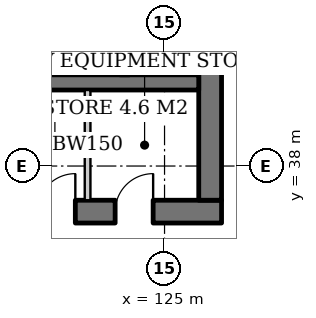
"""IFC4 building model, lengths in metres.
Left out: names, types, materials, properties, quantities, classifications, styles, units other than length and angle.
Written with IfcOpenShell. Run it as: python <this file> out.ifc"""

import sys

from ifc_helpers import new_model, si_unit, direction, frame, frame_2d, origin, place, context, subcontext, project, spatial, rectangle, extrude, element, fill, save


model = new_model("IFC4")
c1 = context("Model", 3, precision=1e-05, world=origin(), true_north=direction((0.0, 1.0)))
c2 = subcontext(c1, "Body", "Model", "MODEL_VIEW")
j1 = project(units=[si_unit("LENGTHUNIT", "METRE"), si_unit("PLANEANGLEUNIT", "RADIAN")], contexts=[c1])
p1 = place(None, origin())
s1 = spatial("IfcSite", under=j1, at=p1, CompositionType="ELEMENT")
p2 = place(p1, origin())
s2 = spatial("IfcBuilding", under=s1, at=p2, CompositionType="ELEMENT")
p3 = place(p2, frame((0.0, 0.0, 6.0)))
s3 = spatial("IfcBuildingStorey", under=s2, at=p3, CompositionType="ELEMENT", Elevation=6.0)
p4 = place(p3, frame((107.5, 36.8, 0.0), z_axis=(0.0, 0.0, 1.0), x_axis=(1.0, 0.0, 0.0)))
e1 = element("IfcWall", 1, at=p4, inside=s3, PredefinedType="SHEAR", context=c2, shape_type="SweptSolid", body=[
    extrude(rectangle(XDim=19.0, YDim=0.6, at=frame_2d((9.5, 0.0))), origin(), (0.0, 0.0, 1.0), 5.0),
])
p5 = place(p4, frame((3.9, 0.0, 0.0)))
e2 = element("IfcOpeningElement", 2, at=p5, cuts=e1, PredefinedType="OPENING", context=c2, shape_type="SweptSolid", body=[
    extrude(rectangle(XDim=1.0, YDim=2.1, at=frame_2d((0.5, 1.05))), frame((0.0, 0.31, 0.0), z_axis=(0.0, -1.0, 0.0), x_axis=(1.0, 0.0, 0.0)), (0.0, 0.0, 1.0), 0.62),
])
p6 = place(p4, frame((14.153, 0.0, 0.0)))
e3 = element("IfcOpeningElement", 3, at=p6, cuts=e1, PredefinedType="OPENING", context=c2, shape_type="SweptSolid", body=[
    extrude(rectangle(XDim=1.0, YDim=2.1, at=frame_2d((0.5, 1.05))), frame((0.0, 0.31, 0.0), z_axis=(0.0, -1.0, 0.0), x_axis=(1.0, 0.0, 0.0)), (0.0, 0.0, 1.0), 0.62),
])
p7 = place(p4, frame((16.2, 0.0, 0.0)))
e4 = element("IfcOpeningElement", 4, at=p7, cuts=e1, PredefinedType="OPENING", context=c2, shape_type="SweptSolid", body=[
    extrude(rectangle(XDim=1.0, YDim=2.1, at=frame_2d((0.5, 1.05))), frame((0.0, 0.31, 0.0), z_axis=(0.0, -1.0, 0.0), x_axis=(1.0, 0.0, 0.0)), (0.0, 0.0, 1.0), 0.62),
])
p8 = place(p3, frame((126.2, 37.1, 0.0), z_axis=(0.0, 0.0, 1.0), x_axis=(0.0, 1.0, 0.0)))
e5 = element("IfcWall", 5, at=p8, inside=s3, PredefinedType="SHEAR", context=c2, shape_type="SweptSolid", body=[
    extrude(rectangle(XDim=17.8, YDim=0.6, at=frame_2d((8.9, 0.0))), origin(), (0.0, 0.0, 1.0), 5.0),
])
p9 = place(p8, frame((8.0, 0.0, 0.0)))
e6 = element("IfcOpeningElement", 6, at=p9, cuts=e5, PredefinedType="OPENING", context=c2, shape_type="SweptSolid", body=[
    extrude(rectangle(XDim=1.8, YDim=2.4, at=frame_2d((0.9, 1.2))), frame((0.0, 0.31, 0.0), z_axis=(0.0, -1.0, 0.0), x_axis=(1.0, 0.0, 0.0)), (0.0, 0.0, 1.0), 0.62),
])
p10 = place(p3, frame((108.1, 40.2, 0.0), z_axis=(0.0, 0.0, 1.0), x_axis=(1.0, 0.0, 0.0)))
e7 = element("IfcWall", 7, at=p10, inside=s3, PredefinedType="SHEAR", context=c2, shape_type="SweptSolid", body=[
    extrude(rectangle(XDim=17.8, YDim=0.4, at=frame_2d((8.9, 0.0))), origin(), (0.0, 0.0, 1.0), 5.0),
])
p11 = place(p3, frame((123.955, 44.25, 0.0), z_axis=(0.0, 0.0, 1.0), x_axis=(0.0, -1.0, 0.0)))
e8 = element("IfcWall", 8, at=p11, inside=s3, PredefinedType="SHEAR", context=c2, shape_type="SweptSolid", body=[
    extrude(rectangle(XDim=3.85, YDim=0.25, at=frame_2d((1.925, 0.0))), origin(), (0.0, 0.0, 1.0), 5.0),
])
p12 = place(p3, frame((122.975, 37.1, 0.0), z_axis=(0.0, 0.0, 1.0), x_axis=(0.0, 1.0, 0.0)))
e9 = element("IfcWall", 9, at=p12, inside=s3, PredefinedType="SOLIDWALL", context=c2, shape_type="SweptSolid", body=[
    extrude(rectangle(XDim=2.9, YDim=0.15, at=frame_2d((1.45, 0.0))), origin(), (0.0, 0.0, 1.0), 4.7),
])
p13 = place(p6, origin())
e10 = element("IfcDoor", 10, at=p13, inside=s3, OperationType="SINGLE_SWING_RIGHT", PredefinedType="DOOR", context=c2, shape_type="SweptSolid", body=[
    extrude(rectangle(XDim=1.0, YDim=2.1, at=frame_2d((0.5, 1.05))), frame((0.0, 0.29, 0.0), z_axis=(0.0, -1.0, 0.0), x_axis=(1.0, 0.0, 0.0)), (0.0, 0.0, 1.0), 0.05),
])
fill(e3, e10)
p14 = place(p7, origin())
e11 = element("IfcDoor", 11, at=p14, inside=s3, OperationType="SINGLE_SWING_RIGHT", PredefinedType="DOOR", context=c2, shape_type="SweptSolid", body=[
    extrude(rectangle(XDim=1.0, YDim=2.1, at=frame_2d((0.5, 1.05))), frame((0.0, 0.29, 0.0), z_axis=(0.0, -1.0, 0.0), x_axis=(1.0, 0.0, 0.0)), (0.0, 0.0, 1.0), 0.05),
])
fill(e4, e11)
save(model, sys.argv[1])
